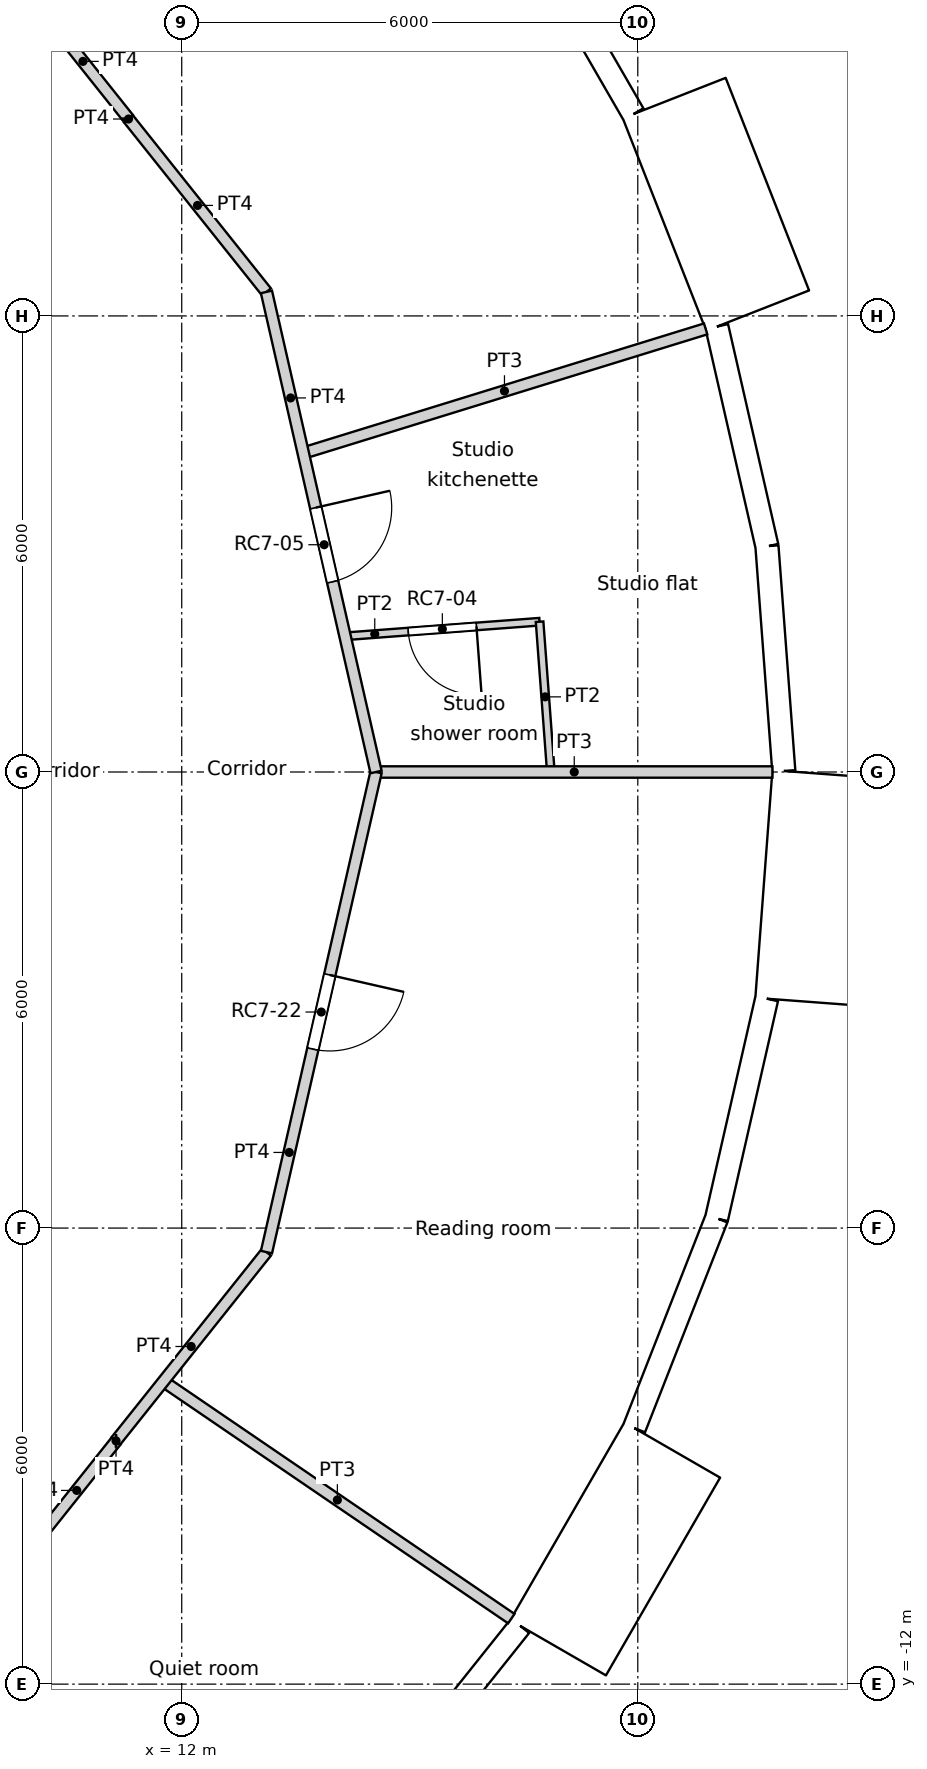
"""IFC4 building model, lengths in metres.
Left out: names, types, materials, properties, quantities, classifications, styles, units other than length and angle.
Written with IfcOpenShell. Run it as: python <this file> out.ifc"""

import sys

from ifc_helpers import new_model, si_unit, direction, frame, frame_2d, origin, origin_2d, place, context, subcontext, project, spatial, rectangle, circle, extrude, element, fill, save


model = new_model("IFC4")
c1 = context("Model", 3, precision=1e-05, world=origin(), true_north=direction((0.0, 1.0)))
c2 = subcontext(c1, "Body", "Model", "MODEL_VIEW")
j1 = project(units=[si_unit("LENGTHUNIT", "METRE"), si_unit("PLANEANGLEUNIT", "RADIAN")], contexts=[c1])
p1 = place(None, origin())
s1 = spatial("IfcSite", under=j1, at=p1, CompositionType="ELEMENT")
p2 = place(p1, origin())
s2 = spatial("IfcBuilding", under=s1, at=p2, CompositionType="ELEMENT")
p3 = place(p2, frame((0.0, 0.0, 294.6)))
s3 = spatial("IfcBuildingStorey", under=s2, at=p3, CompositionType="ELEMENT", Elevation=294.6)
for number, where, z_axis, x_axis in (
    (1, (18.822, 0.0, 0.0), (0.0, 0.0, 1.0), (1.0, 0.0, 0.0)),
    (2, (17.986, 5.548, 0.0), (0.0, 0.0, 1.0), (1.0, 0.0, 0.0)),
    (3, (15.552, -10.603, 0.0), (0.0, 0.0, 1.0), (1.0, 0.0, 0.0)),
    (4, (17.986, -5.548, 0.0), (0.0, 0.0, 1.0), (1.0, 0.0, 0.0)),
):
    element("IfcColumn", number, at=place(p3, frame(where, z_axis=z_axis, x_axis=x_axis)), inside=s3, PredefinedType="COLUMN", context=c2, shape_type="SweptSolid", body=[
        extrude(circle(Radius=0.45, at=origin_2d()), origin(), (0.0, 0.0, 1.0), 3.6),
    ])
p4 = place(p3, frame((19.921, 0.015, 0.0), z_axis=(0.0, 0.0, 1.0), x_axis=(-0.07474897196, 0.997202382263, 0.0)))
e5 = element("IfcWall", 5, at=p4, inside=s3, PredefinedType="SOLIDWALL", context=c2, shape_type="SweptSolid", body=[
    extrude(rectangle(XDim=2.962, YDim=0.3, at=frame_2d((1.481, 0.0))), origin(), (0.0, 0.0, 1.0), 3.25),
])
p5 = place(p4, frame((1.481, 0.0, 1.55)))
e6 = element("IfcOpeningElement", 6, at=p5, cuts=e5, PredefinedType="OPENING", context=c2, shape_type="SweptSolid", body=[
    extrude(circle(Radius=0.9, at=origin_2d()), frame((0.0, 0.16, 0.0), z_axis=(0.0, -1.0, 0.0), x_axis=(1.0, 0.0, 0.0)), (0.0, 0.0, 1.0), 0.32),
])
p6 = place(p3, frame((19.699, 2.969, 0.0), z_axis=(0.0, 0.0, 1.0), x_axis=(-0.222529389789, 0.974925982155, 0.0)))
e7 = element("IfcWall", 7, at=p6, inside=s3, PredefinedType="SOLIDWALL", context=c2, shape_type="SweptSolid", body=[
    extrude(rectangle(XDim=2.962, YDim=0.3, at=frame_2d((1.481, 0.0))), origin(), (0.0, 0.0, 1.0), 3.25),
])
p7 = place(p6, frame((1.481, 0.0, 1.55)))
e8 = element("IfcOpeningElement", 8, at=p7, cuts=e7, PredefinedType="OPENING", context=c2, shape_type="SweptSolid", body=[
    extrude(circle(Radius=0.9, at=origin_2d()), frame((0.0, 0.16, 0.0), z_axis=(0.0, -1.0, 0.0), x_axis=(1.0, 0.0, 0.0)), (0.0, 0.0, 1.0), 0.32),
])
p8 = place(p3, frame((19.576, 6.072, -0.35), z_axis=(0.0, 0.0, 1.0), x_axis=(-0.36537792632, 0.93085926485, 0.0)))
e9 = element("IfcWall", 9, at=p8, inside=s3, PredefinedType="ELEMENTEDWALL", context=c2, shape_type="SweptSolid", body=[
    extrude(rectangle(XDim=3.0, YDim=1.45, at=frame_2d((1.5, 0.0))), origin(), (0.0, 0.0, 1.0), 3.6),
])
p9 = place(p8, frame((1.5, 0.0, 1.9)))
e10 = element("IfcOpeningElement", 10, at=p9, cuts=e9, PredefinedType="OPENING", context=c2, shape_type="SweptSolid", body=[
    extrude(circle(Radius=0.9, at=origin_2d()), frame((0.0, 0.735, 0.0), z_axis=(0.0, -1.0, 0.0), x_axis=(1.0, 0.0, 0.0)), (0.0, 0.0, 1.0), 1.47),
])
p10 = place(p3, frame((17.941, 8.657, 0.0), z_axis=(0.0, 0.0, 1.0), x_axis=(-0.499950756475, 0.86605383268, 0.0)))
e11 = element("IfcWall", 11, at=p10, inside=s3, PredefinedType="SOLIDWALL", context=c2, shape_type="SweptSolid", body=[
    extrude(rectangle(XDim=2.962, YDim=0.3, at=frame_2d((1.481, 0.0))), origin(), (0.0, 0.0, 1.0), 3.25),
])
p11 = place(p10, frame((1.481, 0.0, 1.55)))
e12 = element("IfcOpeningElement", 12, at=p11, cuts=e11, PredefinedType="OPENING", context=c2, shape_type="SweptSolid", body=[
    extrude(circle(Radius=0.9, at=origin_2d()), frame((0.0, 0.16, 0.0), z_axis=(0.0, -1.0, 0.0), x_axis=(1.0, 0.0, 0.0)), (0.0, 0.0, 1.0), 0.32),
])
p12 = place(p3, frame((14.604, -13.55, 0.0), z_axis=(0.0, 0.0, 1.0), x_axis=(0.623498236992, 0.781824755599, 0.0)))
e13 = element("IfcWall", 13, at=p12, inside=s3, PredefinedType="SOLIDWALL", context=c2, shape_type="SweptSolid", body=[
    extrude(rectangle(XDim=2.962, YDim=0.3, at=frame_2d((1.481, 0.0))), origin(), (0.0, 0.0, 1.0), 3.25),
])
p13 = place(p12, frame((1.481, 0.0, 1.55)))
e14 = element("IfcOpeningElement", 14, at=p13, cuts=e13, PredefinedType="OPENING", context=c2, shape_type="SweptSolid", body=[
    extrude(circle(Radius=0.9, at=origin_2d()), frame((0.0, 0.16, 0.0), z_axis=(0.0, -1.0, 0.0), x_axis=(1.0, 0.0, 0.0)), (0.0, 0.0, 1.0), 0.32),
])
p14 = place(p3, frame((16.952, -11.52, -0.35), z_axis=(0.0, 0.0, 1.0), x_axis=(0.499990139034, 0.866031096941, 0.0)))
e15 = element("IfcWall", 15, at=p14, inside=s3, PredefinedType="ELEMENTEDWALL", context=c2, shape_type="SweptSolid", body=[
    extrude(rectangle(XDim=3.0, YDim=1.45, at=frame_2d((1.5, 0.0))), origin(), (0.0, 0.0, 1.0), 3.6),
])
p15 = place(p14, frame((1.5, 0.0, 1.9)))
e16 = element("IfcOpeningElement", 16, at=p15, cuts=e15, PredefinedType="OPENING", context=c2, shape_type="SweptSolid", body=[
    extrude(circle(Radius=0.9, at=origin_2d()), frame((0.0, 0.735, 0.0), z_axis=(0.0, -1.0, 0.0), x_axis=(1.0, 0.0, 0.0)), (0.0, 0.0, 1.0), 1.47),
])
p16 = place(p3, frame((17.955, -8.629, 0.0), z_axis=(0.0, 0.0, 1.0), x_axis=(0.36530043032, 0.930889679612, 0.0)))
e17 = element("IfcWall", 17, at=p16, inside=s3, PredefinedType="SOLIDWALL", context=c2, shape_type="SweptSolid", body=[
    extrude(rectangle(XDim=2.962, YDim=0.3, at=frame_2d((1.481, 0.0))), origin(), (0.0, 0.0, 1.0), 3.25),
])
p17 = place(p16, frame((1.481, 0.0, 1.55)))
e18 = element("IfcOpeningElement", 18, at=p17, cuts=e17, PredefinedType="OPENING", context=c2, shape_type="SweptSolid", body=[
    extrude(circle(Radius=0.9, at=origin_2d()), frame((0.0, 0.16, 0.0), z_axis=(0.0, -1.0, 0.0), x_axis=(1.0, 0.0, 0.0)), (0.0, 0.0, 1.0), 0.32),
])
p18 = place(p3, frame((19.037, -5.872, 0.0), z_axis=(0.0, 0.0, 1.0), x_axis=(0.222529389789, 0.974925982155, 0.0)))
e19 = element("IfcWall", 19, at=p18, inside=s3, PredefinedType="SOLIDWALL", context=c2, shape_type="SweptSolid", body=[
    extrude(rectangle(XDim=2.962, YDim=0.3, at=frame_2d((1.481, 0.0))), origin(), (0.0, 0.0, 1.0), 3.25),
])
p19 = place(p18, frame((1.481, 0.0, 1.55)))
e20 = element("IfcOpeningElement", 20, at=p19, cuts=e19, PredefinedType="OPENING", context=c2, shape_type="SweptSolid", body=[
    extrude(circle(Radius=0.9, at=origin_2d()), frame((0.0, 0.16, 0.0), z_axis=(0.0, -1.0, 0.0), x_axis=(1.0, 0.0, 0.0)), (0.0, 0.0, 1.0), 0.32),
])
p20 = place(p3, frame((20.272, -3.023, -0.35), z_axis=(0.0, 0.0, 1.0), x_axis=(0.074785902127, 0.997199613339, 0.0)))
e21 = element("IfcWall", 21, at=p20, inside=s3, PredefinedType="ELEMENTEDWALL", context=c2, shape_type="SweptSolid", body=[
    extrude(rectangle(XDim=3.0, YDim=1.45, at=frame_2d((1.5, 0.0))), origin(), (0.0, 0.0, 1.0), 3.6),
])
p21 = place(p20, frame((1.5, 0.0, 1.9)))
e22 = element("IfcOpeningElement", 22, at=p21, cuts=e21, PredefinedType="OPENING", context=c2, shape_type="SweptSolid", body=[
    extrude(circle(Radius=0.9, at=origin_2d()), frame((0.0, 0.735, 0.0), z_axis=(0.0, -1.0, 0.0), x_axis=(1.0, 0.0, 0.0)), (0.0, 0.0, 1.0), 1.47),
])
p22 = place(p3, frame((10.101, 10.101, 0.0), z_axis=(0.0, 0.0, 1.0), x_axis=(0.623130947784, -0.782117524362, 0.0)))
e23 = element("IfcWall", 23, at=p22, inside=s3, PredefinedType="PARTITIONING", context=c2, shape_type="SweptSolid", body=[
    extrude(rectangle(XDim=1.924, YDim=0.15, at=frame_2d((0.962, 0.0))), origin(), (0.0, 0.0, 1.0), 3.25),
])
p23 = place(p3, frame((11.3, 8.585, 0.0), z_axis=(0.0, 0.0, 1.0), x_axis=(0.0, 1.0, 0.0)))
e24 = element("IfcWall", 24, at=p23, inside=s3, PredefinedType="PARTITIONING", context=c2, shape_type="SweptSolid", body=[
    extrude(rectangle(XDim=0.011, YDim=0.15, at=frame_2d((0.006, 0.0))), origin(), (0.0, 0.0, 1.0), 3.25),
])
p24 = place(p3, frame((11.137, -8.8, 0.0), z_axis=(0.0, 0.0, 1.0), x_axis=(-1.0, 0.0, 0.0)))
e25 = element("IfcWall", 25, at=p24, inside=s3, PredefinedType="PARTITIONING", context=c2, shape_type="SweptSolid", body=[
    extrude(rectangle(XDim=0.003, YDim=0.15, at=frame_2d((0.001, 0.0))), origin(), (0.0, 0.0, 1.0), 3.25),
])
p25 = place(p3, frame((10.101, -10.101, 0.0), z_axis=(0.0, 0.0, 1.0), x_axis=(0.623098344652, 0.782143498913, 0.0)))
e26 = element("IfcWall", 26, at=p25, inside=s3, PredefinedType="PARTITIONING", context=c2, shape_type="SweptSolid", body=[
    extrude(rectangle(XDim=1.661, YDim=0.15, at=frame_2d((0.831, 0.0))), origin(), (0.0, 0.0, 1.0), 3.25),
])
p26 = place(p3, frame((13.115, 6.316, 0.0), z_axis=(0.0, 0.0, 1.0), x_axis=(0.222568978642, -0.97491694505, 0.0)))
e27 = element("IfcWall", 27, at=p26, inside=s3, PredefinedType="PARTITIONING", context=c2, shape_type="SweptSolid", body=[
    extrude(rectangle(XDim=6.479, YDim=0.15, at=frame_2d((3.239, 0.0))), origin(), (0.0, 0.0, 1.0), 3.25),
])
p27 = place(p26, frame((2.911, 0.0, 0.0)))
e28 = element("IfcOpeningElement", 28, at=p27, cuts=e27, PredefinedType="OPENING", context=c2, shape_type="SweptSolid", body=[
    extrude(rectangle(XDim=1.0, YDim=2.1, at=frame_2d((0.5, 1.05))), frame((0.0, 0.075, 0.0), z_axis=(0.0, -1.0, 0.0), x_axis=(1.0, 0.0, 0.0)), (0.0, 0.0, 1.0), 0.15),
])
p28 = place(p3, frame((11.3, 8.592, 0.0), z_axis=(0.0, 0.0, 1.0), x_axis=(0.623446514299, -0.781866001185, 0.0)))
e29 = element("IfcWall", 29, at=p28, inside=s3, PredefinedType="PARTITIONING", context=c2, shape_type="SweptSolid", body=[
    extrude(rectangle(XDim=2.911, YDim=0.15, at=frame_2d((1.456, 0.0))), origin(), (0.0, 0.0, 1.0), 3.25),
])
p29 = place(p3, frame((11.134, -8.8, 0.0), z_axis=(0.0, 0.0, 1.0), x_axis=(0.623560523309, 0.781775078761, 0.0)))
e30 = element("IfcWall", 30, at=p29, inside=s3, PredefinedType="PARTITIONING", context=c2, shape_type="SweptSolid", body=[
    extrude(rectangle(XDim=3.177, YDim=0.15, at=frame_2d((1.589, 0.0))), origin(), (0.0, 0.0, 1.0), 3.25),
])
p30 = place(p3, frame((13.115, -6.316, 0.0), z_axis=(0.0, 0.0, 1.0), x_axis=(0.222568978642, 0.97491694505, 0.0)))
e31 = element("IfcWall", 31, at=p30, inside=s3, PredefinedType="PARTITIONING", context=c2, shape_type="SweptSolid", body=[
    extrude(rectangle(XDim=6.479, YDim=0.15, at=frame_2d((3.239, 0.0))), origin(), (0.0, 0.0, 1.0), 3.25),
])
p31 = place(p30, frame((2.74, 0.0, 0.0)))
e32 = element("IfcOpeningElement", 32, at=p31, cuts=e31, PredefinedType="OPENING", context=c2, shape_type="SweptSolid", body=[
    extrude(rectangle(XDim=1.0, YDim=2.04, at=frame_2d((0.5, 1.02))), frame((0.0, 0.075, 0.0), z_axis=(0.0, -1.0, 0.0), x_axis=(1.0, 0.0, 0.0)), (0.0, 0.0, 1.0), 0.15),
])
p32 = place(p3, frame((16.708, 1.977, 0.0), z_axis=(0.0, 0.0, 1.0), x_axis=(0.074624634103, -0.997211694669, 0.0)))
e33 = element("IfcWall", 33, at=p32, inside=s3, PredefinedType="PARTITIONING", context=c2, shape_type="SweptSolid", body=[
    extrude(rectangle(XDim=1.983, YDim=0.1, at=frame_2d((0.991, 0.0))), origin(), (0.0, 0.0, 1.0), 3.25),
])
p33 = place(p3, frame((14.149, 1.785, 0.0), z_axis=(0.0, 0.0, 1.0), x_axis=(0.997193275785, 0.074870359477, 0.0)))
e34 = element("IfcWall", 34, at=p33, inside=s3, PredefinedType="PARTITIONING", context=c2, shape_type="SweptSolid", body=[
    extrude(rectangle(XDim=2.566, YDim=0.1, at=frame_2d((1.283, 0.0))), origin(), (0.0, 0.0, 1.0), 3.25),
])
p34 = place(p33, frame((0.833, 0.0, 0.0)))
e35 = element("IfcOpeningElement", 35, at=p34, cuts=e34, PredefinedType="OPENING", context=c2, shape_type="SweptSolid", body=[
    extrude(rectangle(XDim=0.9, YDim=2.04, at=frame_2d((0.45, 1.02))), frame((0.0, 0.05, 0.0), z_axis=(0.0, -1.0, 0.0), x_axis=(1.0, 0.0, 0.0)), (0.0, 0.0, 1.0), 0.1),
])
p35 = place(p3, frame((13.599, 4.195, 0.0), z_axis=(0.0, 0.0, 1.0), x_axis=(0.955510861731, 0.294955917239, 0.0)))
e36 = element("IfcWall", 36, at=p35, inside=s3, PredefinedType="PARTITIONING", context=c2, shape_type="SweptSolid", body=[
    extrude(rectangle(XDim=5.54, YDim=0.15, at=frame_2d((2.77, 0.0))), origin(), (0.0, 0.0, 1.0), 3.25),
])
p36 = place(p3, frame((14.557, 0.0, 0.0), z_axis=(0.0, 0.0, 1.0), x_axis=(1.0, 0.0, 0.0)))
e37 = element("IfcWall", 37, at=p36, inside=s3, PredefinedType="PARTITIONING", context=c2, shape_type="SweptSolid", body=[
    extrude(rectangle(XDim=5.214, YDim=0.15, at=frame_2d((2.607, 0.0))), origin(), (0.0, 0.0, 1.0), 3.25),
])
p37 = place(p3, frame((11.759, -8.017, 0.0), z_axis=(0.0, 0.0, 1.0), x_axis=(0.826207761897, -0.563365542238, 0.0)))
e38 = element("IfcWall", 38, at=p37, inside=s3, PredefinedType="PARTITIONING", context=c2, shape_type="SweptSolid", body=[
    extrude(rectangle(XDim=5.54, YDim=0.15, at=frame_2d((2.77, 0.0))), origin(), (0.0, 0.0, 1.0), 3.25),
])
p38 = place(p5, origin())
e39 = element("IfcWindow", 39, at=p38, inside=s3, PartitioningType="SINGLE_PANEL", PredefinedType="WINDOW", context=c2, shape_type="SweptSolid", body=[
    extrude(circle(Radius=0.9, at=origin_2d()), frame((0.0, 0.12, 0.0), z_axis=(0.0, -1.0, 0.0), x_axis=(1.0, 0.0, 0.0)), (0.0, 0.0, 1.0), 0.1),
])
fill(e6, e39)
p39 = place(p7, origin())
e40 = element("IfcWindow", 40, at=p39, inside=s3, PartitioningType="SINGLE_PANEL", PredefinedType="WINDOW", context=c2, shape_type="SweptSolid", body=[
    extrude(circle(Radius=0.9, at=origin_2d()), frame((0.0, 0.12, 0.0), z_axis=(0.0, -1.0, 0.0), x_axis=(1.0, 0.0, 0.0)), (0.0, 0.0, 1.0), 0.1),
])
fill(e8, e40)
p40 = place(p9, origin())
e41 = element("IfcWindow", 41, at=p40, inside=s3, PartitioningType="SINGLE_PANEL", PredefinedType="WINDOW", context=c2, shape_type="SweptSolid", body=[
    extrude(circle(Radius=0.9, at=origin_2d()), frame((0.0, 0.695, 0.0), z_axis=(0.0, -1.0, 0.0), x_axis=(1.0, 0.0, 0.0)), (0.0, 0.0, 1.0), 0.1),
])
fill(e10, e41)
p41 = place(p11, origin())
e42 = element("IfcWindow", 42, at=p41, inside=s3, PartitioningType="SINGLE_PANEL", PredefinedType="WINDOW", context=c2, shape_type="SweptSolid", body=[
    extrude(circle(Radius=0.9, at=origin_2d()), frame((0.0, 0.12, 0.0), z_axis=(0.0, -1.0, 0.0), x_axis=(1.0, 0.0, 0.0)), (0.0, 0.0, 1.0), 0.1),
])
fill(e12, e42)
p42 = place(p13, origin())
e43 = element("IfcWindow", 43, at=p42, inside=s3, PartitioningType="SINGLE_PANEL", PredefinedType="WINDOW", context=c2, shape_type="SweptSolid", body=[
    extrude(circle(Radius=0.9, at=origin_2d()), frame((0.0, 0.12, 0.0), z_axis=(0.0, -1.0, 0.0), x_axis=(1.0, 0.0, 0.0)), (0.0, 0.0, 1.0), 0.1),
])
fill(e14, e43)
p43 = place(p15, origin())
e44 = element("IfcWindow", 44, at=p43, inside=s3, PartitioningType="SINGLE_PANEL", PredefinedType="WINDOW", context=c2, shape_type="SweptSolid", body=[
    extrude(circle(Radius=0.9, at=origin_2d()), frame((0.0, 0.695, 0.0), z_axis=(0.0, -1.0, 0.0), x_axis=(1.0, 0.0, 0.0)), (0.0, 0.0, 1.0), 0.1),
])
fill(e16, e44)
p44 = place(p17, origin())
e45 = element("IfcWindow", 45, at=p44, inside=s3, PartitioningType="SINGLE_PANEL", PredefinedType="WINDOW", context=c2, shape_type="SweptSolid", body=[
    extrude(circle(Radius=0.9, at=origin_2d()), frame((0.0, 0.12, 0.0), z_axis=(0.0, -1.0, 0.0), x_axis=(1.0, 0.0, 0.0)), (0.0, 0.0, 1.0), 0.1),
])
fill(e18, e45)
p45 = place(p19, origin())
e46 = element("IfcWindow", 46, at=p45, inside=s3, PartitioningType="SINGLE_PANEL", PredefinedType="WINDOW", context=c2, shape_type="SweptSolid", body=[
    extrude(circle(Radius=0.9, at=origin_2d()), frame((0.0, 0.12, 0.0), z_axis=(0.0, -1.0, 0.0), x_axis=(1.0, 0.0, 0.0)), (0.0, 0.0, 1.0), 0.1),
])
fill(e20, e46)
p46 = place(p21, origin())
e47 = element("IfcWindow", 47, at=p46, inside=s3, PartitioningType="SINGLE_PANEL", PredefinedType="WINDOW", context=c2, shape_type="SweptSolid", body=[
    extrude(circle(Radius=0.9, at=origin_2d()), frame((0.0, 0.695, 0.0), z_axis=(0.0, -1.0, 0.0), x_axis=(1.0, 0.0, 0.0)), (0.0, 0.0, 1.0), 0.1),
])
fill(e22, e47)
p47 = place(p34, origin())
e48 = element("IfcDoor", 48, at=p47, inside=s3, OperationType="SINGLE_SWING_LEFT", PredefinedType="DOOR", context=c2, shape_type="SweptSolid", body=[
    extrude(rectangle(XDim=0.9, YDim=2.04, at=frame_2d((0.45, 1.02))), frame((0.0, 0.025, 0.0), z_axis=(0.0, -1.0, 0.0), x_axis=(1.0, 0.0, 0.0)), (0.0, 0.0, 1.0), 0.05),
])
fill(e35, e48)
p48 = place(p27, origin())
e49 = element("IfcDoor", 49, at=p48, inside=s3, OperationType="SINGLE_SWING_LEFT", PredefinedType="DOOR", context=c2, shape_type="SweptSolid", body=[
    extrude(rectangle(XDim=1.0, YDim=2.1, at=frame_2d((0.5, 1.05))), frame((0.0, 0.025, 0.0), z_axis=(0.0, -1.0, 0.0), x_axis=(1.0, 0.0, 0.0)), (0.0, 0.0, 1.0), 0.05),
])
fill(e28, e49)
p49 = place(p31, origin())
e50 = element("IfcDoor", 50, at=p49, inside=s3, OperationType="SINGLE_SWING_LEFT", PredefinedType="DOOR", context=c2, shape_type="SweptSolid", body=[
    extrude(rectangle(XDim=1.0, YDim=2.04, at=frame_2d((0.5, 1.02))), frame((0.0, 0.025, 0.0), z_axis=(0.0, -1.0, 0.0), x_axis=(1.0, 0.0, 0.0)), (0.0, 0.0, 1.0), 0.05),
])
fill(e32, e50)
save(model, sys.argv[1])
